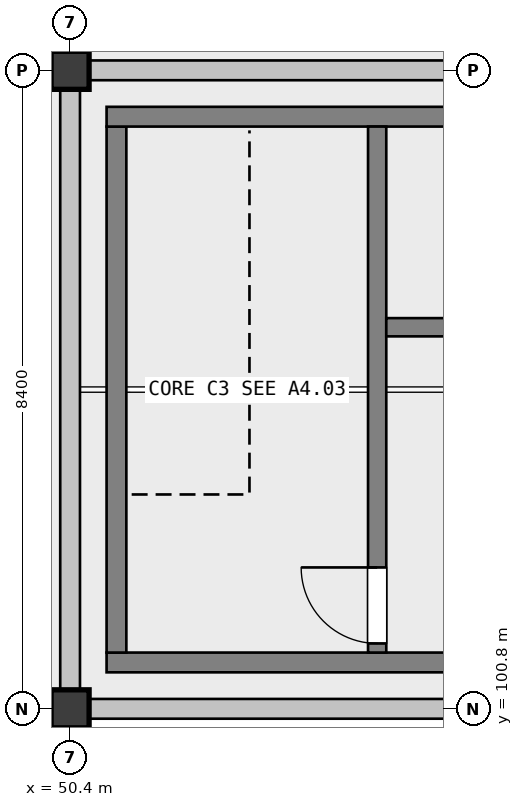
"""IFC4 building model, lengths in metres.
Left out: names, types, materials, properties, quantities, classifications, styles, units other than length and angle.
Written with IfcOpenShell. Run it as: python <this file> out.ifc"""

import sys

from ifc_helpers import new_model, si_unit, direction, frame, frame_2d, origin, origin_2d, place, context, subcontext, project, spatial, rectangle, extrude, element, fill, save


model = new_model("IFC4")
c1 = context("Model", 3, precision=1e-05, world=origin(), true_north=direction((0.0, 1.0)))
c2 = subcontext(c1, "Body", "Model", "MODEL_VIEW")
j1 = project(units=[si_unit("LENGTHUNIT", "METRE"), si_unit("PLANEANGLEUNIT", "RADIAN")], contexts=[c1])
p1 = place(None, origin())
s1 = spatial("IfcSite", under=j1, at=p1, CompositionType="ELEMENT")
p2 = place(p1, origin())
s2 = spatial("IfcBuilding", under=s1, at=p2, CompositionType="ELEMENT")
p3 = place(p2, frame((0.0, 0.0, 27.72)))
s3 = spatial("IfcBuildingStorey", under=s2, at=p3, CompositionType="ELEMENT", Elevation=27.72)
for number, where, z_axis, x_axis in (
    (1, (50.4, 100.8, 0.0), (0.0, 0.0, 1.0), (1.0, 0.0, 0.0)),
    (2, (50.4, 109.2, 0.0), (0.0, 0.0, 1.0), (1.0, 0.0, 0.0)),
):
    element("IfcColumn", number, at=place(p3, frame(where, z_axis=z_axis, x_axis=x_axis)), inside=s3, PredefinedType="COLUMN", context=c2, shape_type="SweptSolid", body=[
        extrude(rectangle(XDim=0.5, YDim=0.5, at=origin_2d()), origin(), (0.0, 0.0, 1.0), 3.09),
    ])
p4 = place(p3, frame((58.549, 100.8, 0.0), z_axis=(0.0, 0.0, 1.0), x_axis=(-1.0, 0.0, 0.0)))
e3 = element("IfcWall", 3, at=p4, inside=s3, PredefinedType="SOLIDWALL", context=c2, shape_type="SweptSolid", body=[
    extrude(rectangle(XDim=7.898, YDim=0.26, at=frame_2d((3.949, 0.0))), origin(), (0.0, 0.0, 1.0), 2.41),
])
p5 = place(p3, frame((50.4, 101.051, 0.0), z_axis=(0.0, 0.0, 1.0), x_axis=(0.0, 1.0, 0.0)))
e4 = element("IfcWall", 4, at=p5, inside=s3, PredefinedType="SOLIDWALL", context=c2, shape_type="SweptSolid", body=[
    extrude(rectangle(XDim=7.898, YDim=0.26, at=frame_2d((3.949, 0.0))), origin(), (0.0, 0.0, 1.0), 2.41),
])
p6 = place(p3, frame((50.651, 109.2, 0.0), z_axis=(0.0, 0.0, 1.0), x_axis=(1.0, 0.0, 0.0)))
e5 = element("IfcWall", 5, at=p6, inside=s3, PredefinedType="SOLIDWALL", context=c2, shape_type="SweptSolid", body=[
    extrude(rectangle(XDim=7.898, YDim=0.26, at=frame_2d((3.949, 0.0))), origin(), (0.0, 0.0, 1.0), 2.41),
])
p7 = place(p3, frame((58.32, 101.41, 0.0), z_axis=(0.0, 0.0, 1.0), x_axis=(-1.0, 0.0, 0.0)))
e6 = element("IfcWall", 6, at=p7, inside=s3, PredefinedType="SHEAR", context=c2, shape_type="SweptSolid", body=[
    extrude(rectangle(XDim=7.44, YDim=0.26, at=frame_2d((3.72, 0.0))), origin(), (0.0, 0.0, 1.0), 3.09),
])
p8 = place(p3, frame((51.01, 101.54, 0.0), z_axis=(0.0, 0.0, 1.0), x_axis=(0.0, 1.0, 0.0)))
e7 = element("IfcWall", 7, at=p8, inside=s3, PredefinedType="SHEAR", context=c2, shape_type="SweptSolid", body=[
    extrude(rectangle(XDim=6.92, YDim=0.26, at=frame_2d((3.46, 0.0))), origin(), (0.0, 0.0, 1.0), 3.09),
])
p9 = place(p3, frame((50.88, 108.59, 0.0), z_axis=(0.0, 0.0, 1.0), x_axis=(1.0, 0.0, 0.0)))
e8 = element("IfcWall", 8, at=p9, inside=s3, PredefinedType="SHEAR", context=c2, shape_type="SweptSolid", body=[
    extrude(rectangle(XDim=7.44, YDim=0.26, at=frame_2d((3.72, 0.0))), origin(), (0.0, 0.0, 1.0), 3.09),
])
p10 = place(p3, frame((54.44, 101.54, 0.0), z_axis=(0.0, 0.0, 1.0), x_axis=(0.0, 1.0, 0.0)))
e9 = element("IfcWall", 9, at=p10, inside=s3, PredefinedType="SHEAR", context=c2, shape_type="SweptSolid", body=[
    extrude(rectangle(XDim=6.92, YDim=0.24, at=frame_2d((3.46, 0.0))), origin(), (0.0, 0.0, 1.0), 3.09),
])
p11 = place(p10, frame((0.12, 0.0, 0.0)))
e10 = element("IfcOpeningElement", 10, at=p11, cuts=e9, PredefinedType="OPENING", context=c2, shape_type="SweptSolid", body=[
    extrude(rectangle(XDim=1.0, YDim=2.15, at=frame_2d((0.5, 1.075))), frame((0.0, 0.12, 0.0), z_axis=(0.0, -1.0, 0.0), x_axis=(1.0, 0.0, 0.0)), (0.0, 0.0, 1.0), 0.24),
])
p12 = place(p3, frame((54.56, 105.82, 0.0), z_axis=(0.0, 0.0, 1.0), x_axis=(1.0, 0.0, 0.0)))
e11 = element("IfcWall", 11, at=p12, inside=s3, PredefinedType="SHEAR", context=c2, shape_type="SweptSolid", body=[
    extrude(rectangle(XDim=3.5, YDim=0.24, at=frame_2d((1.75, 0.0))), origin(), (0.0, 0.0, 1.0), 3.09),
])
p13 = place(p12, frame((1.15, 0.0, 0.0)))
e12 = element("IfcOpeningElement", 12, at=p13, cuts=e11, PredefinedType="OPENING", context=c2, shape_type="SweptSolid", body=[
    extrude(rectangle(XDim=1.2, YDim=2.2, at=frame_2d((0.6, 1.1))), frame((0.0, 0.12, 0.0), z_axis=(0.0, -1.0, 0.0), x_axis=(1.0, 0.0, 0.0)), (0.0, 0.0, 1.0), 0.24),
])
p14 = place(p11, origin())
e13 = element("IfcDoor", 13, at=p14, inside=s3, OperationType="SINGLE_SWING_RIGHT", PredefinedType="DOOR", context=c2, shape_type="SweptSolid", body=[
    extrude(rectangle(XDim=1.0, YDim=2.15, at=frame_2d((0.5, 1.075))), frame((0.0, 0.025, 0.0), z_axis=(0.0, -1.0, 0.0), x_axis=(1.0, 0.0, 0.0)), (0.0, 0.0, 1.0), 0.05),
])
fill(e10, e13)
save(model, sys.argv[1])
